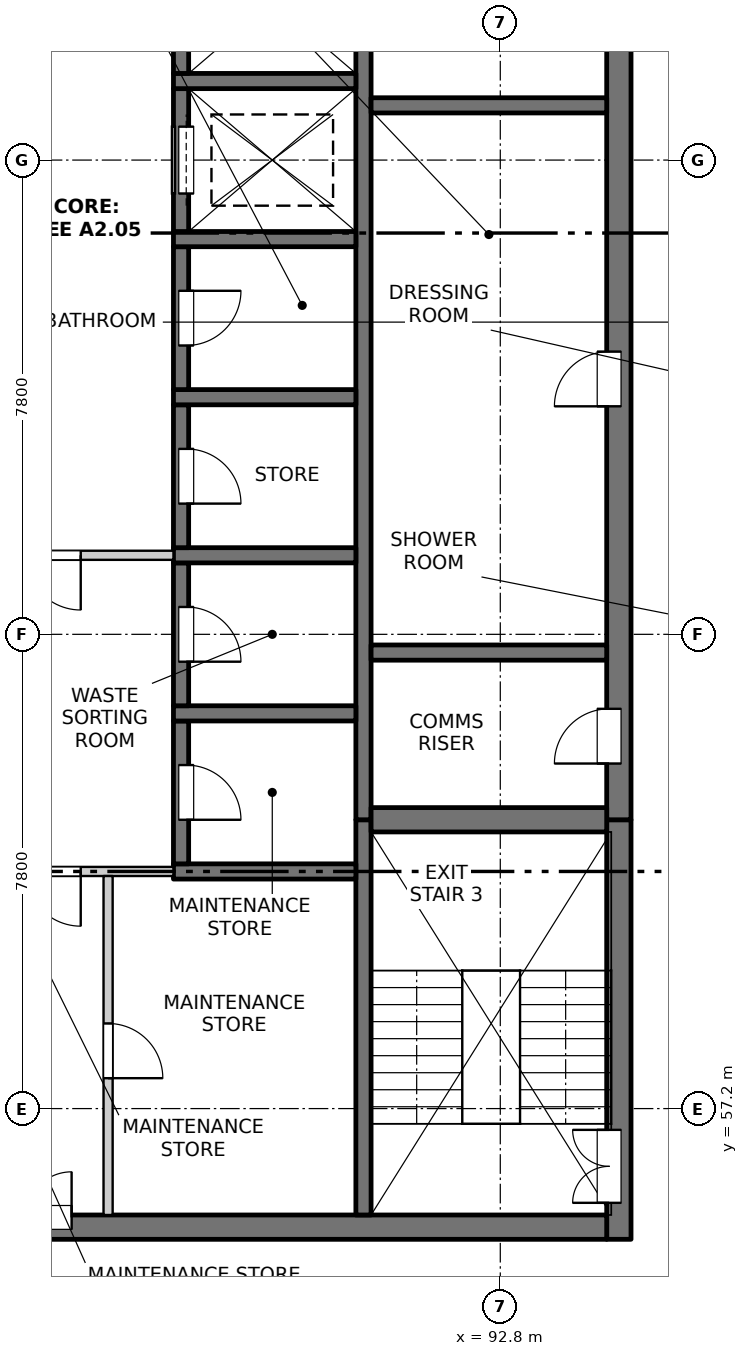
"""IFC4 building model, lengths in metres.
Left out: names, types, materials, properties, quantities, classifications, styles, units other than length and angle.
Written with IfcOpenShell. Run it as: python <this file> out.ifc"""

import sys

from ifc_helpers import new_model, si_unit, direction, frame, frame_2d, origin, place, context, subcontext, project, spatial, rectangle, extrude, element, fill, save


model = new_model("IFC4")
c1 = context("Model", 3, precision=1e-05, world=origin(), true_north=direction((0.0, 1.0)))
c2 = subcontext(c1, "Body", "Model", "MODEL_VIEW")
j1 = project(units=[si_unit("LENGTHUNIT", "METRE"), si_unit("PLANEANGLEUNIT", "RADIAN")], contexts=[c1])
p1 = place(None, origin())
s1 = spatial("IfcSite", under=j1, at=p1, CompositionType="ELEMENT")
p2 = place(p1, origin())
s2 = spatial("IfcBuilding", under=s1, at=p2, CompositionType="ELEMENT")
p3 = place(p2, frame((0.0, 0.0, 231.3)))
s3 = spatial("IfcBuildingStorey", under=s2, at=p3, CompositionType="ELEMENT", Elevation=231.3)
p4 = place(p3, frame((94.75, 55.05, -0.25), z_axis=(0.0, 0.0, 1.0), x_axis=(0.0, 1.0, 0.0)))
e1 = element("IfcWall", 1, at=p4, inside=s3, PredefinedType="SOLIDWALL", context=c2, shape_type="SweptSolid", body=[
    extrude(rectangle(XDim=6.9, YDim=0.4, at=frame_2d((3.45, 0.0))), origin(), (0.0, 0.0, 1.0), 3.4),
])
p5 = place(p4, frame((0.6, 0.0, 0.25)))
e2 = element("IfcOpeningElement", 2, at=p5, cuts=e1, PredefinedType="OPENING", context=c2, shape_type="SweptSolid", body=[
    extrude(rectangle(XDim=1.2, YDim=2.1, at=frame_2d((0.6, 1.05))), frame((0.0, 0.21, 0.0), z_axis=(0.0, -1.0, 0.0), x_axis=(1.0, 0.0, 0.0)), (0.0, 0.0, 1.0), 0.42),
])
p6 = place(p3, frame((94.75, 61.95, -0.25), z_axis=(0.0, 0.0, 1.0), x_axis=(0.0, 1.0, 0.0)))
e3 = element("IfcWall", 3, at=p6, inside=s3, PredefinedType="SOLIDWALL", context=c2, shape_type="SweptSolid", body=[
    extrude(rectangle(XDim=15.35, YDim=0.4, at=frame_2d((7.675, 0.0))), origin(), (0.0, 0.0, 1.0), 3.4),
])
p7 = place(p6, frame((0.925, 0.0, 0.25)))
e4 = element("IfcOpeningElement", 4, at=p7, cuts=e3, PredefinedType="OPENING", context=c2, shape_type="SweptSolid", body=[
    extrude(rectangle(XDim=0.9, YDim=2.1, at=frame_2d((0.45, 1.05))), frame((0.0, 0.21, 0.0), z_axis=(0.0, -1.0, 0.0), x_axis=(1.0, 0.0, 0.0)), (0.0, 0.0, 1.0), 0.42),
])
p8 = place(p6, frame((6.8, 0.0, 0.25)))
e5 = element("IfcOpeningElement", 5, at=p8, cuts=e3, PredefinedType="OPENING", context=c2, shape_type="SweptSolid", body=[
    extrude(rectangle(XDim=0.9, YDim=2.1, at=frame_2d((0.45, 1.05))), frame((0.0, 0.21, 0.0), z_axis=(0.0, -1.0, 0.0), x_axis=(1.0, 0.0, 0.0)), (0.0, 0.0, 1.0), 0.42),
])
p9 = place(p6, frame((13.1, 0.0, 0.25)))
e6 = element("IfcOpeningElement", 6, at=p9, cuts=e3, PredefinedType="OPENING", context=c2, shape_type="SweptSolid", body=[
    extrude(rectangle(XDim=0.9, YDim=2.1, at=frame_2d((0.45, 1.05))), frame((0.0, 0.21, 0.0), z_axis=(0.0, -1.0, 0.0), x_axis=(1.0, 0.0, 0.0)), (0.0, 0.0, 1.0), 0.42),
])
p10 = place(p3, frame((75.45, 55.25, -0.25), z_axis=(0.0, 0.0, 1.0), x_axis=(1.0, 0.0, 0.0)))
e7 = element("IfcWall", 7, at=p10, inside=s3, PredefinedType="SOLIDWALL", context=c2, shape_type="SweptSolid", body=[
    extrude(rectangle(XDim=19.1, YDim=0.4, at=frame_2d((9.55, 0.0))), origin(), (0.0, 0.0, 1.0), 3.4),
])
p11 = place(p10, frame((8.8, 0.0, 0.25)))
e8 = element("IfcOpeningElement", 8, at=p11, cuts=e7, PredefinedType="OPENING", context=c2, shape_type="SweptSolid", body=[
    extrude(rectangle(XDim=1.5, YDim=2.1, at=frame_2d((0.75, 1.05))), frame((0.0, 0.21, 0.0), z_axis=(0.0, -1.0, 0.0), x_axis=(1.0, 0.0, 0.0)), (0.0, 0.0, 1.0), 0.42),
])
p12 = place(p3, frame((90.55, 55.45, -0.25), z_axis=(0.0, 0.0, 1.0), x_axis=(0.0, 1.0, 0.0)))
e9 = element("IfcWall", 9, at=p12, inside=s3, PredefinedType="SOLIDWALL", context=c2, shape_type="SweptSolid", body=[
    extrude(rectangle(XDim=6.5, YDim=0.25, at=frame_2d((3.25, 0.0))), origin(), (0.0, 0.0, 1.0), 3.4),
])
p13 = place(p3, frame((90.55, 61.95, -0.25), z_axis=(0.0, 0.0, 1.0), x_axis=(0.0, 1.0, 0.0)))
e10 = element("IfcWall", 10, at=p13, inside=s3, PredefinedType="SOLIDWALL", context=c2, shape_type="SweptSolid", body=[
    extrude(rectangle(XDim=15.35, YDim=0.25, at=frame_2d((7.675, 0.0))), origin(), (0.0, 0.0, 1.0), 3.4),
])
p14 = place(p3, frame((87.425, 61.1, -0.25), z_axis=(0.0, 0.0, 1.0), x_axis=(1.0, 0.0, 0.0)))
e11 = element("IfcWall", 11, at=p14, inside=s3, PredefinedType="SOLIDWALL", context=c2, shape_type="SweptSolid", body=[
    extrude(rectangle(XDim=3.0, YDim=0.25, at=frame_2d((1.5, 0.0))), origin(), (0.0, 0.0, 1.0), 3.4),
])
p15 = place(p3, frame((87.55, 61.225, -0.25), z_axis=(0.0, 0.0, 1.0), x_axis=(0.0, 1.0, 0.0)))
e12 = element("IfcWall", 12, at=p15, inside=s3, PredefinedType="SOLIDWALL", context=c2, shape_type="SweptSolid", body=[
    extrude(rectangle(XDim=2.35, YDim=0.25, at=frame_2d((1.175, 0.0))), origin(), (0.0, 0.0, 1.0), 3.4),
])
p16 = place(p15, frame((0.725, 0.0, 0.25)))
e13 = element("IfcOpeningElement", 13, at=p16, cuts=e12, PredefinedType="OPENING", context=c2, shape_type="SweptSolid", body=[
    extrude(rectangle(XDim=0.9, YDim=2.1, at=frame_2d((0.45, 1.05))), frame((0.0, 0.135, 0.0), z_axis=(0.0, -1.0, 0.0), x_axis=(1.0, 0.0, 0.0)), (0.0, 0.0, 1.0), 0.27),
])
p17 = place(p3, frame((87.425, 63.7, -0.25), z_axis=(0.0, 0.0, 1.0), x_axis=(1.0, 0.0, 0.0)))
e14 = element("IfcWall", 14, at=p17, inside=s3, PredefinedType="SOLIDWALL", context=c2, shape_type="SweptSolid", body=[
    extrude(rectangle(XDim=3.0, YDim=0.25, at=frame_2d((1.5, 0.0))), origin(), (0.0, 0.0, 1.0), 3.4),
])
p18 = place(p3, frame((87.55, 63.825, -0.25), z_axis=(0.0, 0.0, 1.0), x_axis=(0.0, 1.0, 0.0)))
e15 = element("IfcWall", 15, at=p18, inside=s3, PredefinedType="SOLIDWALL", context=c2, shape_type="SweptSolid", body=[
    extrude(rectangle(XDim=2.35, YDim=0.25, at=frame_2d((1.175, 0.0))), origin(), (0.0, 0.0, 1.0), 3.4),
])
p19 = place(p18, frame((0.725, 0.0, 0.25)))
e16 = element("IfcOpeningElement", 16, at=p19, cuts=e15, PredefinedType="OPENING", context=c2, shape_type="SweptSolid", body=[
    extrude(rectangle(XDim=0.9, YDim=2.1, at=frame_2d((0.45, 1.05))), frame((0.0, 0.135, 0.0), z_axis=(0.0, -1.0, 0.0), x_axis=(1.0, 0.0, 0.0)), (0.0, 0.0, 1.0), 0.27),
])
p20 = place(p3, frame((87.425, 66.3, -0.25), z_axis=(0.0, 0.0, 1.0), x_axis=(1.0, 0.0, 0.0)))
e17 = element("IfcWall", 17, at=p20, inside=s3, PredefinedType="SOLIDWALL", context=c2, shape_type="SweptSolid", body=[
    extrude(rectangle(XDim=3.0, YDim=0.25, at=frame_2d((1.5, 0.0))), origin(), (0.0, 0.0, 1.0), 3.4),
])
p21 = place(p3, frame((87.55, 66.425, -0.25), z_axis=(0.0, 0.0, 1.0), x_axis=(0.0, 1.0, 0.0)))
e18 = element("IfcWall", 18, at=p21, inside=s3, PredefinedType="SOLIDWALL", context=c2, shape_type="SweptSolid", body=[
    extrude(rectangle(XDim=2.35, YDim=0.25, at=frame_2d((1.175, 0.0))), origin(), (0.0, 0.0, 1.0), 3.4),
])
p22 = place(p21, frame((0.725, 0.0, 0.25)))
e19 = element("IfcOpeningElement", 19, at=p22, cuts=e18, PredefinedType="OPENING", context=c2, shape_type="SweptSolid", body=[
    extrude(rectangle(XDim=0.9, YDim=2.1, at=frame_2d((0.45, 1.05))), frame((0.0, 0.135, 0.0), z_axis=(0.0, -1.0, 0.0), x_axis=(1.0, 0.0, 0.0)), (0.0, 0.0, 1.0), 0.27),
])
p23 = place(p3, frame((87.425, 68.9, -0.25), z_axis=(0.0, 0.0, 1.0), x_axis=(1.0, 0.0, 0.0)))
e20 = element("IfcWall", 20, at=p23, inside=s3, PredefinedType="SOLIDWALL", context=c2, shape_type="SweptSolid", body=[
    extrude(rectangle(XDim=3.0, YDim=0.25, at=frame_2d((1.5, 0.0))), origin(), (0.0, 0.0, 1.0), 3.4),
])
p24 = place(p3, frame((87.55, 69.025, -0.25), z_axis=(0.0, 0.0, 1.0), x_axis=(0.0, 1.0, 0.0)))
e21 = element("IfcWall", 21, at=p24, inside=s3, PredefinedType="SOLIDWALL", context=c2, shape_type="SweptSolid", body=[
    extrude(rectangle(XDim=2.35, YDim=0.25, at=frame_2d((1.175, 0.0))), origin(), (0.0, 0.0, 1.0), 3.4),
])
p25 = place(p24, frame((0.725, 0.0, 0.25)))
e22 = element("IfcOpeningElement", 22, at=p25, cuts=e21, PredefinedType="OPENING", context=c2, shape_type="SweptSolid", body=[
    extrude(rectangle(XDim=0.9, YDim=2.1, at=frame_2d((0.45, 1.05))), frame((0.0, 0.135, 0.0), z_axis=(0.0, -1.0, 0.0), x_axis=(1.0, 0.0, 0.0)), (0.0, 0.0, 1.0), 0.27),
])
p26 = place(p3, frame((87.425, 71.5, -0.25), z_axis=(0.0, 0.0, 1.0), x_axis=(1.0, 0.0, 0.0)))
e23 = element("IfcWall", 23, at=p26, inside=s3, PredefinedType="SOLIDWALL", context=c2, shape_type="SweptSolid", body=[
    extrude(rectangle(XDim=3.0, YDim=0.25, at=frame_2d((1.5, 0.0))), origin(), (0.0, 0.0, 1.0), 3.4),
])
p27 = place(p3, frame((87.55, 71.625, -0.25), z_axis=(0.0, 0.0, 1.0), x_axis=(0.0, 1.0, 0.0)))
e24 = element("IfcWall", 24, at=p27, inside=s3, PredefinedType="SOLIDWALL", context=c2, shape_type="SweptSolid", body=[
    extrude(rectangle(XDim=2.35, YDim=0.25, at=frame_2d((1.175, 0.0))), origin(), (0.0, 0.0, 1.0), 3.4),
])
p28 = place(p27, frame((0.625, 0.0, 0.25)))
e25 = element("IfcOpeningElement", 25, at=p28, cuts=e24, PredefinedType="OPENING", context=c2, shape_type="SweptSolid", body=[
    extrude(rectangle(XDim=1.1, YDim=2.1, at=frame_2d((0.55, 1.05))), frame((0.0, 0.135, 0.0), z_axis=(0.0, -1.0, 0.0), x_axis=(1.0, 0.0, 0.0)), (0.0, 0.0, 1.0), 0.27),
])
p29 = place(p3, frame((87.425, 74.1, -0.25), z_axis=(0.0, 0.0, 1.0), x_axis=(1.0, 0.0, 0.0)))
e26 = element("IfcWall", 26, at=p29, inside=s3, PredefinedType="SOLIDWALL", context=c2, shape_type="SweptSolid", body=[
    extrude(rectangle(XDim=3.0, YDim=0.25, at=frame_2d((1.5, 0.0))), origin(), (0.0, 0.0, 1.0), 3.4),
])
p30 = place(p3, frame((87.55, 74.225, -0.25), z_axis=(0.0, 0.0, 1.0), x_axis=(0.0, 1.0, 0.0)))
e27 = element("IfcWall", 27, at=p30, inside=s3, PredefinedType="SOLIDWALL", context=c2, shape_type="SweptSolid", body=[
    extrude(rectangle(XDim=2.35, YDim=0.25, at=frame_2d((1.175, 0.0))), origin(), (0.0, 0.0, 1.0), 3.4),
])
p31 = place(p30, frame((0.625, 0.0, 0.25)))
e28 = element("IfcOpeningElement", 28, at=p31, cuts=e27, PredefinedType="OPENING", context=c2, shape_type="SweptSolid", body=[
    extrude(rectangle(XDim=1.1, YDim=2.1, at=frame_2d((0.55, 1.05))), frame((0.0, 0.135, 0.0), z_axis=(0.0, -1.0, 0.0), x_axis=(1.0, 0.0, 0.0)), (0.0, 0.0, 1.0), 0.27),
])
p32 = place(p3, frame((90.675, 61.95, -0.25), z_axis=(0.0, 0.0, 1.0), x_axis=(1.0, 0.0, 0.0)))
e29 = element("IfcWall", 29, at=p32, inside=s3, PredefinedType="SOLIDWALL", context=c2, shape_type="SweptSolid", body=[
    extrude(rectangle(XDim=3.875, YDim=0.4, at=frame_2d((1.938, 0.0))), origin(), (0.0, 0.0, 1.0), 3.4),
])
for number, where, z_axis, x_axis in (
    (30, (90.675, 64.7, -0.25), (0.0, 0.0, 1.0), (1.0, 0.0, 0.0)),
    (31, (90.675, 73.7, -0.25), (0.0, 0.0, 1.0), (1.0, 0.0, 0.0)),
):
    element("IfcWall", number, at=place(p3, frame(where, z_axis=z_axis, x_axis=x_axis)), inside=s3, PredefinedType="SOLIDWALL", context=c2, shape_type="SweptSolid", body=[
        extrude(rectangle(XDim=3.875, YDim=0.25, at=frame_2d((1.938, 0.0))), origin(), (0.0, 0.0, 1.0), 3.4),
    ])
p33 = place(p3, frame((82.575, 61.1, 0.0), z_axis=(0.0, 0.0, 1.0), x_axis=(1.0, 0.0, 0.0)))
e32 = element("IfcWall", 32, at=p33, inside=s3, PredefinedType="PARTITIONING", context=c2, shape_type="SweptSolid", body=[
    extrude(rectangle(XDim=4.85, YDim=0.15, at=frame_2d((2.425, 0.0))), origin(), (0.0, 0.0, 1.0), 3.15),
])
p34 = place(p33, frame((1.525, 0.0, 0.0)))
e33 = element("IfcOpeningElement", 33, at=p34, cuts=e32, PredefinedType="OPENING", context=c2, shape_type="SweptSolid", body=[
    extrude(rectangle(XDim=1.8, YDim=2.1, at=frame_2d((0.9, 1.05))), frame((0.0, 0.085, 0.0), z_axis=(0.0, -1.0, 0.0), x_axis=(1.0, 0.0, 0.0)), (0.0, 0.0, 1.0), 0.17),
])
p35 = place(p3, frame((82.575, 66.3, 0.0), z_axis=(0.0, 0.0, 1.0), x_axis=(1.0, 0.0, 0.0)))
e34 = element("IfcWall", 34, at=p35, inside=s3, PredefinedType="PARTITIONING", context=c2, shape_type="SweptSolid", body=[
    extrude(rectangle(XDim=4.85, YDim=0.15, at=frame_2d((2.425, 0.0))), origin(), (0.0, 0.0, 1.0), 3.15),
])
p36 = place(p35, frame((1.525, 0.0, 0.0)))
e35 = element("IfcOpeningElement", 35, at=p36, cuts=e34, PredefinedType="OPENING", context=c2, shape_type="SweptSolid", body=[
    extrude(rectangle(XDim=1.8, YDim=2.1, at=frame_2d((0.9, 1.05))), frame((0.0, 0.085, 0.0), z_axis=(0.0, -1.0, 0.0), x_axis=(1.0, 0.0, 0.0)), (0.0, 0.0, 1.0), 0.17),
])
p37 = place(p3, frame((86.35, 55.45, 0.0), z_axis=(0.0, 0.0, 1.0), x_axis=(0.0, 1.0, 0.0)))
e36 = element("IfcWall", 36, at=p37, inside=s3, PredefinedType="PARTITIONING", context=c2, shape_type="SweptSolid", body=[
    extrude(rectangle(XDim=5.575, YDim=0.15, at=frame_2d((2.788, 0.0))), origin(), (0.0, 0.0, 1.0), 3.15),
])
p38 = place(p37, frame((2.25, 0.0, 0.0)))
e37 = element("IfcOpeningElement", 37, at=p38, cuts=e36, PredefinedType="OPENING", context=c2, shape_type="SweptSolid", body=[
    extrude(rectangle(XDim=0.9, YDim=2.1, at=frame_2d((0.45, 1.05))), frame((0.0, 0.085, 0.0), z_axis=(0.0, -1.0, 0.0), x_axis=(1.0, 0.0, 0.0)), (0.0, 0.0, 1.0), 0.17),
])
p39 = place(p11, origin())
e38 = element("IfcDoor", 38, at=p39, inside=s3, OperationType="DOUBLE_DOOR_SINGLE_SWING", PredefinedType="DOOR", context=c2, shape_type="SweptSolid", body=[
    extrude(rectangle(XDim=1.5, YDim=2.1, at=frame_2d((0.75, 1.05))), frame((0.0, 0.185, 0.0), z_axis=(0.0, -1.0, 0.0), x_axis=(1.0, 0.0, 0.0)), (0.0, 0.0, 1.0), 0.05),
])
fill(e8, e38)
p40 = place(p5, origin())
e39 = element("IfcDoor", 39, at=p40, inside=s3, OperationType="DOUBLE_DOOR_SINGLE_SWING", PredefinedType="DOOR", context=c2, shape_type="SweptSolid", body=[
    extrude(rectangle(XDim=1.2, YDim=2.1, at=frame_2d((0.6, 1.05))), frame((0.0, 0.185, 0.0), z_axis=(0.0, -1.0, 0.0), x_axis=(1.0, 0.0, 0.0)), (0.0, 0.0, 1.0), 0.05),
])
fill(e2, e39)
p41 = place(p38, origin())
e40 = element("IfcDoor", 40, at=p41, inside=s3, OperationType="SINGLE_SWING_RIGHT", PredefinedType="DOOR", context=c2, shape_type="SweptSolid", body=[
    extrude(rectangle(XDim=0.9, YDim=2.1, at=frame_2d((0.45, 1.05))), frame((0.0, 0.025, 0.0), z_axis=(0.0, -1.0, 0.0), x_axis=(1.0, 0.0, 0.0)), (0.0, 0.0, 1.0), 0.05),
])
fill(e37, e40)
p42 = place(p34, origin())
e41 = element("IfcDoor", 41, at=p42, inside=s3, OperationType="DOUBLE_DOOR_SINGLE_SWING", PredefinedType="DOOR", context=c2, shape_type="SweptSolid", body=[
    extrude(rectangle(XDim=1.8, YDim=2.1, at=frame_2d((0.9, 1.05))), frame((0.0, 0.025, 0.0), z_axis=(0.0, -1.0, 0.0), x_axis=(1.0, 0.0, 0.0)), (0.0, 0.0, 1.0), 0.05),
])
fill(e33, e41)
p43 = place(p16, origin())
e42 = element("IfcDoor", 42, at=p43, inside=s3, OperationType="SINGLE_SWING_RIGHT", PredefinedType="DOOR", context=c2, shape_type="SweptSolid", body=[
    extrude(rectangle(XDim=0.9, YDim=2.1, at=frame_2d((0.45, 1.05))), frame((0.0, -0.06, 0.0), z_axis=(0.0, -1.0, 0.0), x_axis=(1.0, 0.0, 0.0)), (0.0, 0.0, 1.0), 0.05),
])
fill(e13, e42)
p44 = place(p7, origin())
e43 = element("IfcDoor", 43, at=p44, inside=s3, OperationType="SINGLE_SWING_LEFT", PredefinedType="DOOR", context=c2, shape_type="SweptSolid", body=[
    extrude(rectangle(XDim=0.9, YDim=2.1, at=frame_2d((0.45, 1.05))), frame((0.0, 0.185, 0.0), z_axis=(0.0, -1.0, 0.0), x_axis=(1.0, 0.0, 0.0)), (0.0, 0.0, 1.0), 0.05),
])
fill(e4, e43)
p45 = place(p19, origin())
e44 = element("IfcDoor", 44, at=p45, inside=s3, OperationType="SINGLE_SWING_RIGHT", PredefinedType="DOOR", context=c2, shape_type="SweptSolid", body=[
    extrude(rectangle(XDim=0.9, YDim=2.1, at=frame_2d((0.45, 1.05))), frame((0.0, -0.06, 0.0), z_axis=(0.0, -1.0, 0.0), x_axis=(1.0, 0.0, 0.0)), (0.0, 0.0, 1.0), 0.05),
])
fill(e16, e44)
p46 = place(p36, origin())
e45 = element("IfcDoor", 45, at=p46, inside=s3, OperationType="DOUBLE_DOOR_SINGLE_SWING", PredefinedType="DOOR", context=c2, shape_type="SweptSolid", body=[
    extrude(rectangle(XDim=1.8, YDim=2.1, at=frame_2d((0.9, 1.05))), frame((0.0, 0.025, 0.0), z_axis=(0.0, -1.0, 0.0), x_axis=(1.0, 0.0, 0.0)), (0.0, 0.0, 1.0), 0.05),
])
fill(e35, e45)
p47 = place(p22, origin())
e46 = element("IfcDoor", 46, at=p47, inside=s3, OperationType="SINGLE_SWING_RIGHT", PredefinedType="DOOR", context=c2, shape_type="SweptSolid", body=[
    extrude(rectangle(XDim=0.9, YDim=2.1, at=frame_2d((0.45, 1.05))), frame((0.0, -0.06, 0.0), z_axis=(0.0, -1.0, 0.0), x_axis=(1.0, 0.0, 0.0)), (0.0, 0.0, 1.0), 0.05),
])
fill(e19, e46)
p48 = place(p8, origin())
e47 = element("IfcDoor", 47, at=p48, inside=s3, OperationType="SINGLE_SWING_LEFT", PredefinedType="DOOR", context=c2, shape_type="SweptSolid", body=[
    extrude(rectangle(XDim=0.9, YDim=2.1, at=frame_2d((0.45, 1.05))), frame((0.0, 0.185, 0.0), z_axis=(0.0, -1.0, 0.0), x_axis=(1.0, 0.0, 0.0)), (0.0, 0.0, 1.0), 0.05),
])
fill(e5, e47)
p49 = place(p25, origin())
e48 = element("IfcDoor", 48, at=p49, inside=s3, OperationType="SINGLE_SWING_LEFT", PredefinedType="DOOR", context=c2, shape_type="SweptSolid", body=[
    extrude(rectangle(XDim=0.9, YDim=2.1, at=frame_2d((0.45, 1.05))), frame((0.0, -0.06, 0.0), z_axis=(0.0, -1.0, 0.0), x_axis=(1.0, 0.0, 0.0)), (0.0, 0.0, 1.0), 0.05),
])
fill(e22, e48)
p50 = place(p28, origin())
e49 = element("IfcDoor", 49, at=p50, inside=s3, OperationType="SLIDING_TO_LEFT", PredefinedType="DOOR", context=c2, shape_type="SweptSolid", body=[
    extrude(rectangle(XDim=1.1, YDim=2.1, at=frame_2d((0.55, 1.05))), frame((0.0, -0.06, 0.0), z_axis=(0.0, -1.0, 0.0), x_axis=(1.0, 0.0, 0.0)), (0.0, 0.0, 1.0), 0.05),
])
fill(e25, e49)
save(model, sys.argv[1])
